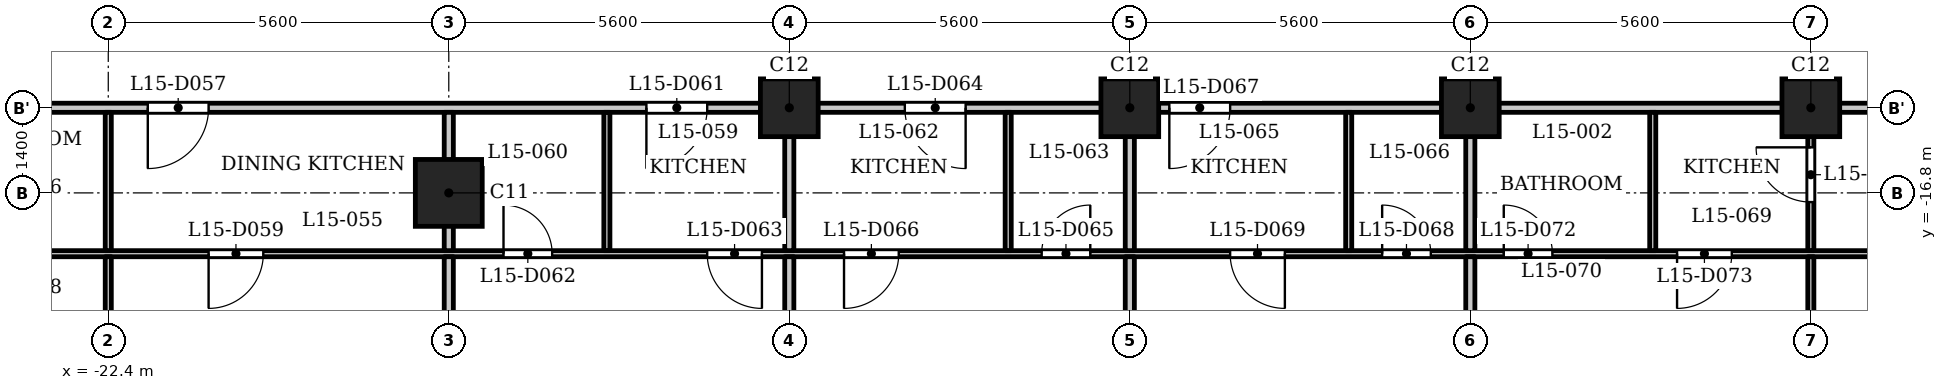
"""IFC4 building model, lengths in metres.
Left out: names, types, materials, properties, quantities, classifications, styles, units other than length and angle.
Written with IfcOpenShell. Run it as: python <this file> out.ifc"""

import sys

from ifc_helpers import new_model, si_unit, direction, frame, frame_2d, origin, origin_2d, place, context, subcontext, project, spatial, rectangle, extrude, element, fill, save


model = new_model("IFC4")
c1 = context("Model", 3, precision=1e-05, world=origin(), true_north=direction((0.0, 1.0)))
c2 = subcontext(c1, "Body", "Model", "MODEL_VIEW")
j1 = project(units=[si_unit("LENGTHUNIT", "METRE"), si_unit("PLANEANGLEUNIT", "RADIAN")], contexts=[c1])
p1 = place(None, origin())
s1 = spatial("IfcSite", under=j1, at=p1, CompositionType="ELEMENT")
p2 = place(p1, origin())
s2 = spatial("IfcBuilding", under=s1, at=p2, CompositionType="ELEMENT")
p3 = place(p2, frame((0.0, 0.0, 62.0)))
s3 = spatial("IfcBuildingStorey", under=s2, at=p3, CompositionType="ELEMENT", Elevation=62.0)
p4 = place(p3, frame((-16.8, -16.8, 0.0), z_axis=(0.0, 0.0, 1.0), x_axis=(1.0, 0.0, 0.0)))
e1 = element("IfcColumn", 1, at=p4, inside=s3, PredefinedType="COLUMN", context=c2, shape_type="SweptSolid", body=[
    extrude(rectangle(XDim=1.1, YDim=1.1, at=origin_2d()), origin(), (0.0, 0.0, 1.0), 3.5),
])
for number, where, z_axis, x_axis in (
    (2, (-11.2, -15.4, 0.0), (0.0, 0.0, 1.0), (1.0, 0.0, 0.0)),
    (3, (-5.6, -15.4, 0.0), (0.0, 0.0, 1.0), (1.0, 0.0, 0.0)),
    (4, (0.0, -15.4, 0.0), (0.0, 0.0, 1.0), (1.0, 0.0, 0.0)),
    (5, (5.6, -15.4, 0.0), (0.0, 0.0, 1.0), (1.0, 0.0, 0.0)),
):
    element("IfcColumn", number, at=place(p3, frame(where, z_axis=z_axis, x_axis=x_axis)), inside=s3, PredefinedType="COLUMN", context=c2, shape_type="SweptSolid", body=[
        extrude(rectangle(XDim=0.95, YDim=0.95, at=origin_2d()), origin(), (0.0, 0.0, 1.0), 3.5),
    ])
p5 = place(p3, frame((-26.394, -17.8, 0.0), z_axis=(0.0, 0.0, 1.0), x_axis=(1.0, 0.0, 0.0)))
e6 = element("IfcWall", 6, at=p5, inside=s3, PredefinedType="PARTITIONING", context=c2, shape_type="SweptSolid", body=[
    extrude(rectangle(XDim=53.034, YDim=0.1, at=frame_2d((26.517, 0.0))), origin(), (0.0, 0.0, 1.0), 3.2),
])
p6 = place(p5, frame((0.794, 0.0, 0.0)))
e7 = element("IfcOpeningElement", 7, at=p6, cuts=e6, PredefinedType="OPENING", context=c2, shape_type="SweptSolid", body=[
    extrude(rectangle(XDim=0.8, YDim=2.1, at=frame_2d((0.4, 1.05))), frame((0.0, 0.06, 0.0), z_axis=(0.0, -1.0, 0.0), x_axis=(1.0, 0.0, 0.0)), (0.0, 0.0, 1.0), 0.12),
])
p7 = place(p5, frame((5.644, 0.0, 0.0)))
e8 = element("IfcOpeningElement", 8, at=p7, cuts=e6, PredefinedType="OPENING", context=c2, shape_type="SweptSolid", body=[
    extrude(rectangle(XDim=0.9, YDim=2.1, at=frame_2d((0.45, 1.05))), frame((0.0, 0.06, 0.0), z_axis=(0.0, -1.0, 0.0), x_axis=(1.0, 0.0, 0.0)), (0.0, 0.0, 1.0), 0.12),
])
p8 = place(p5, frame((10.494, 0.0, 0.0)))
e9 = element("IfcOpeningElement", 9, at=p8, cuts=e6, PredefinedType="OPENING", context=c2, shape_type="SweptSolid", body=[
    extrude(rectangle(XDim=0.8, YDim=2.1, at=frame_2d((0.4, 1.05))), frame((0.0, 0.06, 0.0), z_axis=(0.0, -1.0, 0.0), x_axis=(1.0, 0.0, 0.0)), (0.0, 0.0, 1.0), 0.12),
])
p9 = place(p5, frame((13.844, 0.0, 0.0)))
e10 = element("IfcOpeningElement", 10, at=p9, cuts=e6, PredefinedType="OPENING", context=c2, shape_type="SweptSolid", body=[
    extrude(rectangle(XDim=0.9, YDim=2.1, at=frame_2d((0.45, 1.05))), frame((0.0, 0.06, 0.0), z_axis=(0.0, -1.0, 0.0), x_axis=(1.0, 0.0, 0.0)), (0.0, 0.0, 1.0), 0.12),
])
p10 = place(p5, frame((19.344, 0.0, 0.0)))
e11 = element("IfcOpeningElement", 11, at=p10, cuts=e6, PredefinedType="OPENING", context=c2, shape_type="SweptSolid", body=[
    extrude(rectangle(XDim=0.8, YDim=2.1, at=frame_2d((0.4, 1.05))), frame((0.0, 0.06, 0.0), z_axis=(0.0, -1.0, 0.0), x_axis=(1.0, 0.0, 0.0)), (0.0, 0.0, 1.0), 0.12),
])
p11 = place(p5, frame((16.094, 0.0, 0.0)))
e12 = element("IfcOpeningElement", 12, at=p11, cuts=e6, PredefinedType="OPENING", context=c2, shape_type="SweptSolid", body=[
    extrude(rectangle(XDim=0.9, YDim=2.1, at=frame_2d((0.45, 1.05))), frame((0.0, 0.06, 0.0), z_axis=(0.0, -1.0, 0.0), x_axis=(1.0, 0.0, 0.0)), (0.0, 0.0, 1.0), 0.12),
])
p12 = place(p5, frame((24.944, 0.0, 0.0)))
e13 = element("IfcOpeningElement", 13, at=p12, cuts=e6, PredefinedType="OPENING", context=c2, shape_type="SweptSolid", body=[
    extrude(rectangle(XDim=0.8, YDim=2.1, at=frame_2d((0.4, 1.05))), frame((0.0, 0.06, 0.0), z_axis=(0.0, -1.0, 0.0), x_axis=(1.0, 0.0, 0.0)), (0.0, 0.0, 1.0), 0.12),
])
p13 = place(p5, frame((22.444, 0.0, 0.0)))
e14 = element("IfcOpeningElement", 14, at=p13, cuts=e6, PredefinedType="OPENING", context=c2, shape_type="SweptSolid", body=[
    extrude(rectangle(XDim=0.9, YDim=2.1, at=frame_2d((0.45, 1.05))), frame((0.0, 0.06, 0.0), z_axis=(0.0, -1.0, 0.0), x_axis=(1.0, 0.0, 0.0)), (0.0, 0.0, 1.0), 0.12),
])
p14 = place(p5, frame((26.944, 0.0, 0.0)))
e15 = element("IfcOpeningElement", 15, at=p14, cuts=e6, PredefinedType="OPENING", context=c2, shape_type="SweptSolid", body=[
    extrude(rectangle(XDim=0.8, YDim=2.1, at=frame_2d((0.4, 1.05))), frame((0.0, 0.06, 0.0), z_axis=(0.0, -1.0, 0.0), x_axis=(1.0, 0.0, 0.0)), (0.0, 0.0, 1.0), 0.12),
])
p15 = place(p5, frame((29.794, 0.0, 0.0)))
e16 = element("IfcOpeningElement", 16, at=p15, cuts=e6, PredefinedType="OPENING", context=c2, shape_type="SweptSolid", body=[
    extrude(rectangle(XDim=0.9, YDim=2.1, at=frame_2d((0.45, 1.05))), frame((0.0, 0.06, 0.0), z_axis=(0.0, -1.0, 0.0), x_axis=(1.0, 0.0, 0.0)), (0.0, 0.0, 1.0), 0.12),
])
p16 = place(p5, frame((33.394, 0.0, 0.0)))
e17 = element("IfcOpeningElement", 17, at=p16, cuts=e6, PredefinedType="OPENING", context=c2, shape_type="SweptSolid", body=[
    extrude(rectangle(XDim=0.9, YDim=2.1, at=frame_2d((0.45, 1.05))), frame((0.0, 0.06, 0.0), z_axis=(0.0, -1.0, 0.0), x_axis=(1.0, 0.0, 0.0)), (0.0, 0.0, 1.0), 0.12),
])
p17 = place(p5, frame((34.944, 0.0, 0.0)))
e18 = element("IfcOpeningElement", 18, at=p17, cuts=e6, PredefinedType="OPENING", context=c2, shape_type="SweptSolid", body=[
    extrude(rectangle(XDim=0.9, YDim=2.1, at=frame_2d((0.45, 1.05))), frame((0.0, 0.06, 0.0), z_axis=(0.0, -1.0, 0.0), x_axis=(1.0, 0.0, 0.0)), (0.0, 0.0, 1.0), 0.12),
])
p18 = place(p5, frame((38.144, 0.0, 0.0)))
e19 = element("IfcOpeningElement", 19, at=p18, cuts=e6, PredefinedType="OPENING", context=c2, shape_type="SweptSolid", body=[
    extrude(rectangle(XDim=0.8, YDim=2.1, at=frame_2d((0.4, 1.05))), frame((0.0, 0.06, 0.0), z_axis=(0.0, -1.0, 0.0), x_axis=(1.0, 0.0, 0.0)), (0.0, 0.0, 1.0), 0.12),
])
p19 = place(p5, frame((40.244, 0.0, 0.0)))
e20 = element("IfcOpeningElement", 20, at=p19, cuts=e6, PredefinedType="OPENING", context=c2, shape_type="SweptSolid", body=[
    extrude(rectangle(XDim=0.9, YDim=2.1, at=frame_2d((0.45, 1.05))), frame((0.0, 0.06, 0.0), z_axis=(0.0, -1.0, 0.0), x_axis=(1.0, 0.0, 0.0)), (0.0, 0.0, 1.0), 0.12),
])
p20 = place(p5, frame((49.362, 0.0, 0.0)))
e21 = element("IfcOpeningElement", 21, at=p20, cuts=e6, PredefinedType="OPENING", context=c2, shape_type="SweptSolid", body=[
    extrude(rectangle(XDim=0.8, YDim=2.1, at=frame_2d((0.4, 1.05))), frame((0.0, 0.06, 0.0), z_axis=(0.0, -1.0, 0.0), x_axis=(1.0, 0.0, 0.0)), (0.0, 0.0, 1.0), 0.12),
])
p21 = place(p5, frame((45.094, 0.0, 0.0)))
e22 = element("IfcOpeningElement", 22, at=p21, cuts=e6, PredefinedType="OPENING", context=c2, shape_type="SweptSolid", body=[
    extrude(rectangle(XDim=0.9, YDim=2.1, at=frame_2d((0.45, 1.05))), frame((0.0, 0.06, 0.0), z_axis=(0.0, -1.0, 0.0), x_axis=(1.0, 0.0, 0.0)), (0.0, 0.0, 1.0), 0.12),
])
p22 = place(p3, frame((-27.484, -15.4, 0.0), z_axis=(0.0, 0.0, 1.0), x_axis=(1.0, 0.0, 0.0)))
e23 = element("IfcWall", 23, at=p22, inside=s3, PredefinedType="PARTITIONING", context=c2, shape_type="SweptSolid", body=[
    extrude(rectangle(XDim=54.968, YDim=0.15, at=frame_2d((27.484, 0.0))), origin(), (0.0, 0.0, 1.0), 3.2),
])
p23 = place(p22, frame((5.734, 0.0, 0.0)))
e24 = element("IfcOpeningElement", 24, at=p23, cuts=e23, PredefinedType="OPENING", context=c2, shape_type="SweptSolid", body=[
    extrude(rectangle(XDim=1.0, YDim=2.1, at=frame_2d((0.5, 1.05))), frame((0.0, 0.085, 0.0), z_axis=(0.0, -1.0, 0.0), x_axis=(1.0, 0.0, 0.0)), (0.0, 0.0, 1.0), 0.17),
])
p24 = place(p22, frame((13.934, 0.0, 0.0)))
e25 = element("IfcOpeningElement", 25, at=p24, cuts=e23, PredefinedType="OPENING", context=c2, shape_type="SweptSolid", body=[
    extrude(rectangle(XDim=1.0, YDim=2.1, at=frame_2d((0.5, 1.05))), frame((0.0, 0.085, 0.0), z_axis=(0.0, -1.0, 0.0), x_axis=(1.0, 0.0, 0.0)), (0.0, 0.0, 1.0), 0.17),
])
p25 = place(p22, frame((18.184, 0.0, 0.0)))
e26 = element("IfcOpeningElement", 26, at=p25, cuts=e23, PredefinedType="OPENING", context=c2, shape_type="SweptSolid", body=[
    extrude(rectangle(XDim=1.0, YDim=2.1, at=frame_2d((0.5, 1.05))), frame((0.0, 0.085, 0.0), z_axis=(0.0, -1.0, 0.0), x_axis=(1.0, 0.0, 0.0)), (0.0, 0.0, 1.0), 0.17),
])
p26 = place(p22, frame((22.534, 0.0, 0.0)))
e27 = element("IfcOpeningElement", 27, at=p26, cuts=e23, PredefinedType="OPENING", context=c2, shape_type="SweptSolid", body=[
    extrude(rectangle(XDim=1.0, YDim=2.1, at=frame_2d((0.5, 1.05))), frame((0.0, 0.085, 0.0), z_axis=(0.0, -1.0, 0.0), x_axis=(1.0, 0.0, 0.0)), (0.0, 0.0, 1.0), 0.17),
])
p27 = place(p22, frame((36.984, 0.0, 0.0)))
e28 = element("IfcOpeningElement", 28, at=p27, cuts=e23, PredefinedType="OPENING", context=c2, shape_type="SweptSolid", body=[
    extrude(rectangle(XDim=1.0, YDim=2.1, at=frame_2d((0.5, 1.05))), frame((0.0, 0.085, 0.0), z_axis=(0.0, -1.0, 0.0), x_axis=(1.0, 0.0, 0.0)), (0.0, 0.0, 1.0), 0.17),
])
p28 = place(p22, frame((42.334, 0.0, 0.0)))
e29 = element("IfcOpeningElement", 29, at=p28, cuts=e23, PredefinedType="OPENING", context=c2, shape_type="SweptSolid", body=[
    extrude(rectangle(XDim=1.0, YDim=2.1, at=frame_2d((0.5, 1.05))), frame((0.0, 0.085, 0.0), z_axis=(0.0, -1.0, 0.0), x_axis=(1.0, 0.0, 0.0)), (0.0, 0.0, 1.0), 0.17),
])
p29 = place(p22, frame((45.184, 0.0, 0.0)))
e30 = element("IfcOpeningElement", 30, at=p29, cuts=e23, PredefinedType="OPENING", context=c2, shape_type="SweptSolid", body=[
    extrude(rectangle(XDim=1.0, YDim=2.1, at=frame_2d((0.5, 1.05))), frame((0.0, 0.085, 0.0), z_axis=(0.0, -1.0, 0.0), x_axis=(1.0, 0.0, 0.0)), (0.0, 0.0, 1.0), 0.17),
])
p30 = place(p3, frame((-22.4, -21.72, 0.0), z_axis=(0.0, 0.0, 1.0), x_axis=(0.0, 1.0, 0.0)))
e31 = element("IfcWall", 31, at=p30, inside=s3, PredefinedType="PARTITIONING", context=c2, shape_type="SweptSolid", body=[
    extrude(rectangle(XDim=3.87, YDim=0.1, at=frame_2d((1.935, 0.0))), origin(), (0.0, 0.0, 1.0), 3.2),
])
p31 = place(p30, frame((1.87, 0.0, 0.0)))
e32 = element("IfcOpeningElement", 32, at=p31, cuts=e31, PredefinedType="OPENING", context=c2, shape_type="SweptSolid", body=[
    extrude(rectangle(XDim=0.9, YDim=2.1, at=frame_2d((0.45, 1.05))), frame((0.0, 0.06, 0.0), z_axis=(0.0, -1.0, 0.0), x_axis=(1.0, 0.0, 0.0)), (0.0, 0.0, 1.0), 0.12),
])
p32 = place(p3, frame((-22.4, -17.75, 0.0), z_axis=(0.0, 0.0, 1.0), x_axis=(0.0, 1.0, 0.0)))
e33 = element("IfcWall", 33, at=p32, inside=s3, PredefinedType="PARTITIONING", context=c2, shape_type="SweptSolid", body=[
    extrude(rectangle(XDim=2.275, YDim=0.1, at=frame_2d((1.137, 0.0))), origin(), (0.0, 0.0, 1.0), 3.2),
])
p33 = place(p3, frame((-16.8, -23.08, 0.0), z_axis=(0.0, 0.0, 1.0), x_axis=(0.0, 1.0, 0.0)))
e34 = element("IfcWall", 34, at=p33, inside=s3, PredefinedType="PARTITIONING", context=c2, shape_type="SweptSolid", body=[
    extrude(rectangle(XDim=5.23, YDim=0.15, at=frame_2d((2.615, 0.0))), origin(), (0.0, 0.0, 1.0), 3.2),
])
p34 = place(p3, frame((-16.8, -17.75, 0.0), z_axis=(0.0, 0.0, 1.0), x_axis=(0.0, 1.0, 0.0)))
e35 = element("IfcWall", 35, at=p34, inside=s3, PredefinedType="PARTITIONING", context=c2, shape_type="SweptSolid", body=[
    extrude(rectangle(XDim=2.275, YDim=0.15, at=frame_2d((1.137, 0.0))), origin(), (0.0, 0.0, 1.0), 3.2),
])
p35 = place(p3, frame((-14.2, -17.75, 0.0), z_axis=(0.0, 0.0, 1.0), x_axis=(0.0, 1.0, 0.0)))
e36 = element("IfcWall", 36, at=p35, inside=s3, PredefinedType="PARTITIONING", context=c2, shape_type="SweptSolid", body=[
    extrude(rectangle(XDim=2.275, YDim=0.1, at=frame_2d((1.137, 0.0))), origin(), (0.0, 0.0, 1.0), 3.2),
])
p36 = place(p3, frame((-11.2, -23.08, 0.0), z_axis=(0.0, 0.0, 1.0), x_axis=(0.0, 1.0, 0.0)))
e37 = element("IfcWall", 37, at=p36, inside=s3, PredefinedType="PARTITIONING", context=c2, shape_type="SweptSolid", body=[
    extrude(rectangle(XDim=5.23, YDim=0.15, at=frame_2d((2.615, 0.0))), origin(), (0.0, 0.0, 1.0), 3.2),
])
p37 = place(p3, frame((-11.2, -17.75, 0.0), z_axis=(0.0, 0.0, 1.0), x_axis=(0.0, 1.0, 0.0)))
e38 = element("IfcWall", 38, at=p37, inside=s3, PredefinedType="PARTITIONING", context=c2, shape_type="SweptSolid", body=[
    extrude(rectangle(XDim=2.275, YDim=0.15, at=frame_2d((1.137, 0.0))), origin(), (0.0, 0.0, 1.0), 3.2),
])
p38 = place(p3, frame((-7.6, -17.75, 0.0), z_axis=(0.0, 0.0, 1.0), x_axis=(0.0, 1.0, 0.0)))
e39 = element("IfcWall", 39, at=p38, inside=s3, PredefinedType="PARTITIONING", context=c2, shape_type="SweptSolid", body=[
    extrude(rectangle(XDim=2.275, YDim=0.1, at=frame_2d((1.137, 0.0))), origin(), (0.0, 0.0, 1.0), 3.2),
])
p39 = place(p3, frame((-5.6, -23.08, 0.0), z_axis=(0.0, 0.0, 1.0), x_axis=(0.0, 1.0, 0.0)))
e40 = element("IfcWall", 40, at=p39, inside=s3, PredefinedType="PARTITIONING", context=c2, shape_type="SweptSolid", body=[
    extrude(rectangle(XDim=5.23, YDim=0.15, at=frame_2d((2.615, 0.0))), origin(), (0.0, 0.0, 1.0), 3.2),
])
p40 = place(p3, frame((-5.6, -17.75, 0.0), z_axis=(0.0, 0.0, 1.0), x_axis=(0.0, 1.0, 0.0)))
e41 = element("IfcWall", 41, at=p40, inside=s3, PredefinedType="PARTITIONING", context=c2, shape_type="SweptSolid", body=[
    extrude(rectangle(XDim=2.275, YDim=0.15, at=frame_2d((1.137, 0.0))), origin(), (0.0, 0.0, 1.0), 3.2),
])
p41 = place(p3, frame((-2.0, -17.75, 0.0), z_axis=(0.0, 0.0, 1.0), x_axis=(0.0, 1.0, 0.0)))
e42 = element("IfcWall", 42, at=p41, inside=s3, PredefinedType="PARTITIONING", context=c2, shape_type="SweptSolid", body=[
    extrude(rectangle(XDim=2.275, YDim=0.1, at=frame_2d((1.137, 0.0))), origin(), (0.0, 0.0, 1.0), 3.2),
])
p42 = place(p3, frame((0.0, -23.08, 0.0), z_axis=(0.0, 0.0, 1.0), x_axis=(0.0, 1.0, 0.0)))
e43 = element("IfcWall", 43, at=p42, inside=s3, PredefinedType="PARTITIONING", context=c2, shape_type="SweptSolid", body=[
    extrude(rectangle(XDim=5.23, YDim=0.15, at=frame_2d((2.615, 0.0))), origin(), (0.0, 0.0, 1.0), 3.2),
])
p43 = place(p3, frame((0.0, -17.75, 0.0), z_axis=(0.0, 0.0, 1.0), x_axis=(0.0, 1.0, 0.0)))
e44 = element("IfcWall", 44, at=p43, inside=s3, PredefinedType="PARTITIONING", context=c2, shape_type="SweptSolid", body=[
    extrude(rectangle(XDim=2.275, YDim=0.15, at=frame_2d((1.137, 0.0))), origin(), (0.0, 0.0, 1.0), 3.2),
])
p44 = place(p3, frame((3.0, -17.75, 0.0), z_axis=(0.0, 0.0, 1.0), x_axis=(0.0, 1.0, 0.0)))
e45 = element("IfcWall", 45, at=p44, inside=s3, PredefinedType="PARTITIONING", context=c2, shape_type="SweptSolid", body=[
    extrude(rectangle(XDim=2.275, YDim=0.1, at=frame_2d((1.137, 0.0))), origin(), (0.0, 0.0, 1.0), 3.2),
])
p45 = place(p3, frame((5.6, -23.08, 0.0), z_axis=(0.0, 0.0, 1.0), x_axis=(0.0, 1.0, 0.0)))
e46 = element("IfcWall", 46, at=p45, inside=s3, PredefinedType="PARTITIONING", context=c2, shape_type="SweptSolid", body=[
    extrude(rectangle(XDim=5.23, YDim=0.1, at=frame_2d((2.615, 0.0))), origin(), (0.0, 0.0, 1.0), 3.2),
])
p46 = place(p3, frame((5.6, -17.75, 0.0), z_axis=(0.0, 0.0, 1.0), x_axis=(0.0, 1.0, 0.0)))
e47 = element("IfcWall", 47, at=p46, inside=s3, PredefinedType="PARTITIONING", context=c2, shape_type="SweptSolid", body=[
    extrude(rectangle(XDim=2.275, YDim=0.1, at=frame_2d((1.137, 0.0))), origin(), (0.0, 0.0, 1.0), 3.2),
])
p47 = place(p46, frame((0.799, 0.0, 0.0)))
e48 = element("IfcOpeningElement", 48, at=p47, cuts=e47, PredefinedType="OPENING", context=c2, shape_type="SweptSolid", body=[
    extrude(rectangle(XDim=0.9, YDim=2.1, at=frame_2d((0.45, 1.05))), frame((0.0, 0.06, 0.0), z_axis=(0.0, -1.0, 0.0), x_axis=(1.0, 0.0, 0.0)), (0.0, 0.0, 1.0), 0.12),
])
p48 = place(p23, origin())
e49 = element("IfcDoor", 49, at=p48, inside=s3, OperationType="SINGLE_SWING_LEFT", PredefinedType="DOOR", context=c2, shape_type="SweptSolid", body=[
    extrude(rectangle(XDim=1.0, YDim=2.1, at=frame_2d((0.5, 1.05))), frame((0.0, 0.025, 0.0), z_axis=(0.0, -1.0, 0.0), x_axis=(1.0, 0.0, 0.0)), (0.0, 0.0, 1.0), 0.05),
])
fill(e24, e49)
p49 = place(p7, origin())
e50 = element("IfcDoor", 50, at=p49, inside=s3, OperationType="SINGLE_SWING_LEFT", PredefinedType="DOOR", context=c2, shape_type="SweptSolid", body=[
    extrude(rectangle(XDim=0.9, YDim=2.1, at=frame_2d((0.45, 1.05))), frame((0.0, 0.025, 0.0), z_axis=(0.0, -1.0, 0.0), x_axis=(1.0, 0.0, 0.0)), (0.0, 0.0, 1.0), 0.05),
])
fill(e8, e50)
p50 = place(p24, origin())
e51 = element("IfcDoor", 51, at=p50, inside=s3, OperationType="SINGLE_SWING_LEFT", PredefinedType="DOOR", context=c2, shape_type="SweptSolid", body=[
    extrude(rectangle(XDim=1.0, YDim=2.1, at=frame_2d((0.5, 1.05))), frame((0.0, 0.025, 0.0), z_axis=(0.0, -1.0, 0.0), x_axis=(1.0, 0.0, 0.0)), (0.0, 0.0, 1.0), 0.05),
])
fill(e25, e51)
p51 = place(p8, origin())
e52 = element("IfcDoor", 52, at=p51, inside=s3, OperationType="SINGLE_SWING_RIGHT", PredefinedType="DOOR", context=c2, shape_type="SweptSolid", body=[
    extrude(rectangle(XDim=0.8, YDim=2.1, at=frame_2d((0.4, 1.05))), frame((0.0, 0.025, 0.0), z_axis=(0.0, -1.0, 0.0), x_axis=(1.0, 0.0, 0.0)), (0.0, 0.0, 1.0), 0.05),
])
fill(e9, e52)
p52 = place(p9, origin())
e53 = element("IfcDoor", 53, at=p52, inside=s3, OperationType="SINGLE_SWING_RIGHT", PredefinedType="DOOR", context=c2, shape_type="SweptSolid", body=[
    extrude(rectangle(XDim=0.9, YDim=2.1, at=frame_2d((0.45, 1.05))), frame((0.0, 0.025, 0.0), z_axis=(0.0, -1.0, 0.0), x_axis=(1.0, 0.0, 0.0)), (0.0, 0.0, 1.0), 0.05),
])
fill(e10, e53)
p53 = place(p25, origin())
e54 = element("IfcDoor", 54, at=p53, inside=s3, OperationType="SINGLE_SWING_RIGHT", PredefinedType="DOOR", context=c2, shape_type="SweptSolid", body=[
    extrude(rectangle(XDim=1.0, YDim=2.1, at=frame_2d((0.5, 1.05))), frame((0.0, 0.025, 0.0), z_axis=(0.0, -1.0, 0.0), x_axis=(1.0, 0.0, 0.0)), (0.0, 0.0, 1.0), 0.05),
])
fill(e26, e54)
p54 = place(p10, origin())
e55 = element("IfcDoor", 55, at=p54, inside=s3, OperationType="SINGLE_SWING_LEFT", PredefinedType="DOOR", context=c2, shape_type="SweptSolid", body=[
    extrude(rectangle(XDim=0.8, YDim=2.1, at=frame_2d((0.4, 1.05))), frame((0.0, 0.025, 0.0), z_axis=(0.0, -1.0, 0.0), x_axis=(1.0, 0.0, 0.0)), (0.0, 0.0, 1.0), 0.05),
])
fill(e11, e55)
p55 = place(p11, origin())
e56 = element("IfcDoor", 56, at=p55, inside=s3, OperationType="SINGLE_SWING_LEFT", PredefinedType="DOOR", context=c2, shape_type="SweptSolid", body=[
    extrude(rectangle(XDim=0.9, YDim=2.1, at=frame_2d((0.45, 1.05))), frame((0.0, 0.025, 0.0), z_axis=(0.0, -1.0, 0.0), x_axis=(1.0, 0.0, 0.0)), (0.0, 0.0, 1.0), 0.05),
])
fill(e12, e56)
p56 = place(p26, origin())
e57 = element("IfcDoor", 57, at=p56, inside=s3, OperationType="SINGLE_SWING_LEFT", PredefinedType="DOOR", context=c2, shape_type="SweptSolid", body=[
    extrude(rectangle(XDim=1.0, YDim=2.1, at=frame_2d((0.5, 1.05))), frame((0.0, 0.025, 0.0), z_axis=(0.0, -1.0, 0.0), x_axis=(1.0, 0.0, 0.0)), (0.0, 0.0, 1.0), 0.05),
])
fill(e27, e57)
p57 = place(p12, origin())
e58 = element("IfcDoor", 58, at=p57, inside=s3, OperationType="SINGLE_SWING_RIGHT", PredefinedType="DOOR", context=c2, shape_type="SweptSolid", body=[
    extrude(rectangle(XDim=0.8, YDim=2.1, at=frame_2d((0.4, 1.05))), frame((0.0, 0.025, 0.0), z_axis=(0.0, -1.0, 0.0), x_axis=(1.0, 0.0, 0.0)), (0.0, 0.0, 1.0), 0.05),
])
fill(e13, e58)
p58 = place(p13, origin())
e59 = element("IfcDoor", 59, at=p58, inside=s3, OperationType="SINGLE_SWING_RIGHT", PredefinedType="DOOR", context=c2, shape_type="SweptSolid", body=[
    extrude(rectangle(XDim=0.9, YDim=2.1, at=frame_2d((0.45, 1.05))), frame((0.0, 0.025, 0.0), z_axis=(0.0, -1.0, 0.0), x_axis=(1.0, 0.0, 0.0)), (0.0, 0.0, 1.0), 0.05),
])
fill(e14, e59)
p59 = place(p47, origin())
e60 = element("IfcDoor", 60, at=p59, inside=s3, OperationType="SINGLE_SWING_LEFT", PredefinedType="DOOR", context=c2, shape_type="SweptSolid", body=[
    extrude(rectangle(XDim=0.9, YDim=2.1, at=frame_2d((0.45, 1.05))), frame((0.0, 0.025, 0.0), z_axis=(0.0, -1.0, 0.0), x_axis=(1.0, 0.0, 0.0)), (0.0, 0.0, 1.0), 0.05),
])
fill(e48, e60)
p60 = place(p14, origin())
e61 = element("IfcDoor", 61, at=p60, inside=s3, OperationType="SINGLE_SWING_RIGHT", PredefinedType="DOOR", context=c2, shape_type="SweptSolid", body=[
    extrude(rectangle(XDim=0.8, YDim=2.1, at=frame_2d((0.4, 1.05))), frame((0.0, 0.025, 0.0), z_axis=(0.0, -1.0, 0.0), x_axis=(1.0, 0.0, 0.0)), (0.0, 0.0, 1.0), 0.05),
])
fill(e15, e61)
p61 = place(p15, origin())
e62 = element("IfcDoor", 62, at=p61, inside=s3, OperationType="SINGLE_SWING_LEFT", PredefinedType="DOOR", context=c2, shape_type="SweptSolid", body=[
    extrude(rectangle(XDim=0.9, YDim=2.1, at=frame_2d((0.45, 1.05))), frame((0.0, 0.025, 0.0), z_axis=(0.0, -1.0, 0.0), x_axis=(1.0, 0.0, 0.0)), (0.0, 0.0, 1.0), 0.05),
])
fill(e16, e62)
save(model, sys.argv[1])
